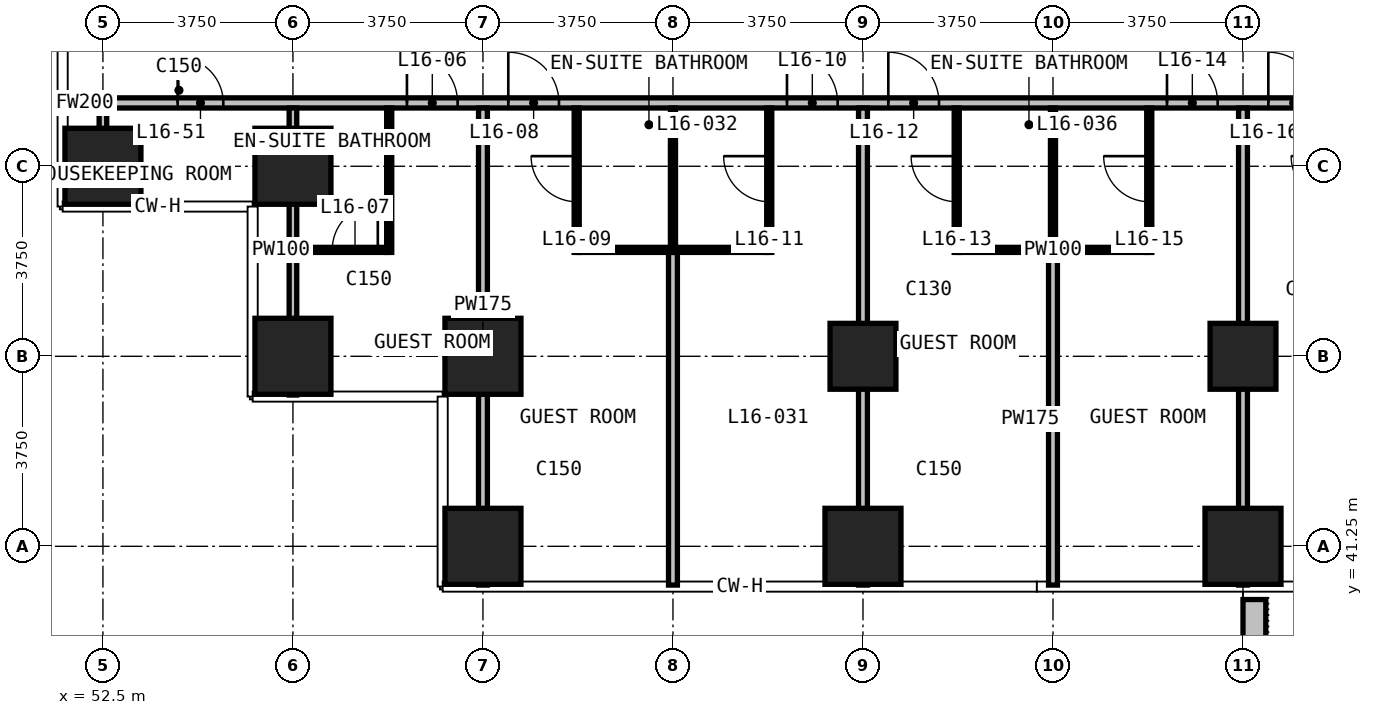
"""IFC4 building model, lengths in metres.
Left out: names, types, materials, properties, quantities, classifications, styles, units other than length and angle.
Written with IfcOpenShell. Run it as: python <this file> out.ifc"""

import sys

from ifc_helpers import new_model, si_unit, direction, frame, frame_2d, origin, origin_2d, place, context, subcontext, project, spatial, rectangle, extrude, element, fill, save


model = new_model("IFC4")
c1 = context("Model", 3, precision=1e-05, world=origin(), true_north=direction((0.0, 1.0)))
c2 = subcontext(c1, "Body", "Model", "MODEL_VIEW")
j1 = project(units=[si_unit("LENGTHUNIT", "METRE"), si_unit("PLANEANGLEUNIT", "RADIAN")], contexts=[c1])
p1 = place(None, origin())
s1 = spatial("IfcSite", under=j1, at=p1, CompositionType="ELEMENT")
p2 = place(p1, origin())
s2 = spatial("IfcBuilding", under=s1, at=p2, CompositionType="ELEMENT")
p3 = place(p2, frame((0.0, 0.0, 72.5)))
s3 = spatial("IfcBuildingStorey", under=s2, at=p3, CompositionType="ELEMENT", Elevation=72.5)
for number, where, z_axis, x_axis in (
    (1, (52.5, 48.75, 0.0), (0.0, 0.0, 1.0), (1.0, 0.0, 0.0)),
    (2, (56.25, 45.0, 0.0), (0.0, 0.0, 1.0), (1.0, 0.0, 0.0)),
    (3, (56.25, 48.75, 0.0), (0.0, 0.0, 1.0), (1.0, 0.0, 0.0)),
    (4, (60.0, 41.25, 0.0), (0.0, 0.0, 1.0), (1.0, 0.0, 0.0)),
    (5, (60.0, 45.0, 0.0), (0.0, 0.0, 1.0), (1.0, 0.0, 0.0)),
    (6, (67.5, 41.25, 0.0), (0.0, 0.0, 1.0), (1.0, 0.0, 0.0)),
):
    element("IfcColumn", number, at=place(p3, frame(where, z_axis=z_axis, x_axis=x_axis)), inside=s3, PredefinedType="COLUMN", context=c2, shape_type="SweptSolid", body=[
        extrude(rectangle(XDim=1.5, YDim=1.5, at=origin_2d()), origin(), (0.0, 0.0, 1.0), 3.3),
    ])
p4 = place(p3, frame((67.5, 45.0, 0.0), z_axis=(0.0, 0.0, 1.0), x_axis=(1.0, 0.0, 0.0)))
e7 = element("IfcColumn", 7, at=p4, inside=s3, PredefinedType="COLUMN", context=c2, shape_type="SweptSolid", body=[
    extrude(rectangle(XDim=1.3, YDim=1.3, at=origin_2d()), origin(), (0.0, 0.0, 1.0), 3.3),
])
p5 = place(p3, frame((75.0, 41.25, 0.0), z_axis=(0.0, 0.0, 1.0), x_axis=(1.0, 0.0, 0.0)))
e8 = element("IfcColumn", 8, at=p5, inside=s3, PredefinedType="COLUMN", context=c2, shape_type="SweptSolid", body=[
    extrude(rectangle(XDim=1.5, YDim=1.5, at=origin_2d()), origin(), (0.0, 0.0, 1.0), 3.3),
])
p6 = place(p3, frame((75.0, 45.0, 0.0), z_axis=(0.0, 0.0, 1.0), x_axis=(1.0, 0.0, 0.0)))
e9 = element("IfcColumn", 9, at=p6, inside=s3, PredefinedType="COLUMN", context=c2, shape_type="SweptSolid", body=[
    extrude(rectangle(XDim=1.3, YDim=1.3, at=origin_2d()), origin(), (0.0, 0.0, 1.0), 3.3),
])
p7 = place(p3, frame((75.225, 40.2, 0.0), z_axis=(0.0, 0.0, 1.0), x_axis=(0.0, -1.0, 0.0)))
e10 = element("IfcWall", 10, at=p7, inside=s3, PredefinedType="USERDEFINED", context=c2, shape_type="SweptSolid", body=[
    extrude(rectangle(XDim=2.35, YDim=0.45, at=frame_2d((1.175, 0.0))), origin(), (0.0, 0.0, 1.0), 1.1),
])
p8 = place(p3, frame((51.855, 50.0, 0.0), z_axis=(0.0, 0.0, 1.0), x_axis=(1.0, 0.0, 0.0)))
e11 = element("IfcWall", 11, at=p8, inside=s3, PredefinedType="PARTITIONING", context=c2, shape_type="SweptSolid", body=[
    extrude(rectangle(XDim=0.57, YDim=0.2, at=frame_2d((0.285, 0.0))), origin(), (0.0, 0.0, 1.0), 3.0),
])
p9 = place(p3, frame((52.575, 50.0, 0.0), z_axis=(0.0, 0.0, 1.0), x_axis=(1.0, 0.0, 0.0)))
e12 = element("IfcWall", 12, at=p9, inside=s3, PredefinedType="PARTITIONING", context=c2, shape_type="SweptSolid", body=[
    extrude(rectangle(XDim=44.85, YDim=0.2, at=frame_2d((22.425, 0.0))), origin(), (0.0, 0.0, 1.0), 3.0),
])
p10 = place(p9, frame((5.925, 0.0, 0.0)))
e13 = element("IfcOpeningElement", 13, at=p10, cuts=e12, PredefinedType="OPENING", context=c2, shape_type="SweptSolid", body=[
    extrude(rectangle(XDim=1.0, YDim=2.2, at=frame_2d((0.5, 1.1))), frame((0.0, 0.11, 0.0), z_axis=(0.0, -1.0, 0.0), x_axis=(1.0, 0.0, 0.0)), (0.0, 0.0, 1.0), 0.22),
])
p11 = place(p9, frame((7.925, 0.0, 0.0)))
e14 = element("IfcOpeningElement", 14, at=p11, cuts=e12, PredefinedType="OPENING", context=c2, shape_type="SweptSolid", body=[
    extrude(rectangle(XDim=1.0, YDim=2.2, at=frame_2d((0.5, 1.1))), frame((0.0, 0.11, 0.0), z_axis=(0.0, -1.0, 0.0), x_axis=(1.0, 0.0, 0.0)), (0.0, 0.0, 1.0), 0.22),
])
p12 = place(p9, frame((13.425, 0.0, 0.0)))
e15 = element("IfcOpeningElement", 15, at=p12, cuts=e12, PredefinedType="OPENING", context=c2, shape_type="SweptSolid", body=[
    extrude(rectangle(XDim=1.0, YDim=2.2, at=frame_2d((0.5, 1.1))), frame((0.0, 0.11, 0.0), z_axis=(0.0, -1.0, 0.0), x_axis=(1.0, 0.0, 0.0)), (0.0, 0.0, 1.0), 0.22),
])
p13 = place(p9, frame((15.425, 0.0, 0.0)))
e16 = element("IfcOpeningElement", 16, at=p13, cuts=e12, PredefinedType="OPENING", context=c2, shape_type="SweptSolid", body=[
    extrude(rectangle(XDim=1.0, YDim=2.2, at=frame_2d((0.5, 1.1))), frame((0.0, 0.11, 0.0), z_axis=(0.0, -1.0, 0.0), x_axis=(1.0, 0.0, 0.0)), (0.0, 0.0, 1.0), 0.22),
])
p14 = place(p9, frame((20.925, 0.0, 0.0)))
e17 = element("IfcOpeningElement", 17, at=p14, cuts=e12, PredefinedType="OPENING", context=c2, shape_type="SweptSolid", body=[
    extrude(rectangle(XDim=1.0, YDim=2.2, at=frame_2d((0.5, 1.1))), frame((0.0, 0.11, 0.0), z_axis=(0.0, -1.0, 0.0), x_axis=(1.0, 0.0, 0.0)), (0.0, 0.0, 1.0), 0.22),
])
p15 = place(p9, frame((22.925, 0.0, 0.0)))
e18 = element("IfcOpeningElement", 18, at=p15, cuts=e12, PredefinedType="OPENING", context=c2, shape_type="SweptSolid", body=[
    extrude(rectangle(XDim=1.0, YDim=2.2, at=frame_2d((0.5, 1.1))), frame((0.0, 0.11, 0.0), z_axis=(0.0, -1.0, 0.0), x_axis=(1.0, 0.0, 0.0)), (0.0, 0.0, 1.0), 0.22),
])
p16 = place(p9, frame((28.425, 0.0, 0.0)))
e19 = element("IfcOpeningElement", 19, at=p16, cuts=e12, PredefinedType="OPENING", context=c2, shape_type="SweptSolid", body=[
    extrude(rectangle(XDim=1.0, YDim=2.2, at=frame_2d((0.5, 1.1))), frame((0.0, 0.11, 0.0), z_axis=(0.0, -1.0, 0.0), x_axis=(1.0, 0.0, 0.0)), (0.0, 0.0, 1.0), 0.22),
])
p17 = place(p9, frame((30.425, 0.0, 0.0)))
e20 = element("IfcOpeningElement", 20, at=p17, cuts=e12, PredefinedType="OPENING", context=c2, shape_type="SweptSolid", body=[
    extrude(rectangle(XDim=1.0, YDim=2.2, at=frame_2d((0.5, 1.1))), frame((0.0, 0.11, 0.0), z_axis=(0.0, -1.0, 0.0), x_axis=(1.0, 0.0, 0.0)), (0.0, 0.0, 1.0), 0.22),
])
p18 = place(p9, frame((35.925, 0.0, 0.0)))
e21 = element("IfcOpeningElement", 21, at=p18, cuts=e12, PredefinedType="OPENING", context=c2, shape_type="SweptSolid", body=[
    extrude(rectangle(XDim=1.0, YDim=2.2, at=frame_2d((0.5, 1.1))), frame((0.0, 0.11, 0.0), z_axis=(0.0, -1.0, 0.0), x_axis=(1.0, 0.0, 0.0)), (0.0, 0.0, 1.0), 0.22),
])
p19 = place(p9, frame((37.925, 0.0, 0.0)))
e22 = element("IfcOpeningElement", 22, at=p19, cuts=e12, PredefinedType="OPENING", context=c2, shape_type="SweptSolid", body=[
    extrude(rectangle(XDim=1.0, YDim=2.2, at=frame_2d((0.5, 1.1))), frame((0.0, 0.11, 0.0), z_axis=(0.0, -1.0, 0.0), x_axis=(1.0, 0.0, 0.0)), (0.0, 0.0, 1.0), 0.22),
])
p20 = place(p9, frame((1.4, 0.0, 0.0)))
e23 = element("IfcOpeningElement", 23, at=p20, cuts=e12, PredefinedType="OPENING", context=c2, shape_type="SweptSolid", body=[
    extrude(rectangle(XDim=0.9, YDim=2.2, at=frame_2d((0.45, 1.1))), frame((0.0, 0.11, 0.0), z_axis=(0.0, -1.0, 0.0), x_axis=(1.0, 0.0, 0.0)), (0.0, 0.0, 1.0), 0.22),
])
p21 = place(p9, frame((42.575, 0.0, 0.0)))
e24 = element("IfcOpeningElement", 24, at=p21, cuts=e12, PredefinedType="OPENING", context=c2, shape_type="SweptSolid", body=[
    extrude(rectangle(XDim=0.9, YDim=2.2, at=frame_2d((0.45, 1.1))), frame((0.0, 0.11, 0.0), z_axis=(0.0, -1.0, 0.0), x_axis=(1.0, 0.0, 0.0)), (0.0, 0.0, 1.0), 0.22),
])
p22 = place(p3, frame((60.0, 40.485, 0.0), z_axis=(0.0, 0.0, 1.0), x_axis=(0.0, 1.0, 0.0)))
e25 = element("IfcWall", 25, at=p22, inside=s3, PredefinedType="PARTITIONING", context=c2, shape_type="SweptSolid", body=[
    extrude(rectangle(XDim=9.415, YDim=0.175, at=frame_2d((4.708, 0.0))), origin(), (0.0, 0.0, 1.0), 3.0),
])
p23 = place(p3, frame((63.75, 40.485, 0.0), z_axis=(0.0, 0.0, 1.0), x_axis=(0.0, 1.0, 0.0)))
e26 = element("IfcWall", 26, at=p23, inside=s3, PredefinedType="PARTITIONING", context=c2, shape_type="SweptSolid", body=[
    extrude(rectangle(XDim=6.565, YDim=0.175, at=frame_2d((3.282, 0.0))), origin(), (0.0, 0.0, 1.0), 3.0),
])
p24 = place(p3, frame((67.5, 40.485, 0.0), z_axis=(0.0, 0.0, 1.0), x_axis=(0.0, 1.0, 0.0)))
e27 = element("IfcWall", 27, at=p24, inside=s3, PredefinedType="PARTITIONING", context=c2, shape_type="SweptSolid", body=[
    extrude(rectangle(XDim=9.415, YDim=0.175, at=frame_2d((4.708, 0.0))), origin(), (0.0, 0.0, 1.0), 3.0),
])
p25 = place(p3, frame((71.25, 40.485, 0.0), z_axis=(0.0, 0.0, 1.0), x_axis=(0.0, 1.0, 0.0)))
e28 = element("IfcWall", 28, at=p25, inside=s3, PredefinedType="PARTITIONING", context=c2, shape_type="SweptSolid", body=[
    extrude(rectangle(XDim=6.565, YDim=0.175, at=frame_2d((3.282, 0.0))), origin(), (0.0, 0.0, 1.0), 3.0),
])
p26 = place(p3, frame((75.0, 40.485, 0.0), z_axis=(0.0, 0.0, 1.0), x_axis=(0.0, 1.0, 0.0)))
e29 = element("IfcWall", 29, at=p26, inside=s3, PredefinedType="PARTITIONING", context=c2, shape_type="SweptSolid", body=[
    extrude(rectangle(XDim=9.415, YDim=0.175, at=frame_2d((4.708, 0.0))), origin(), (0.0, 0.0, 1.0), 3.0),
])
p27 = place(p3, frame((52.5, 48.105, 0.0), z_axis=(0.0, 0.0, 1.0), x_axis=(0.0, 1.0, 0.0)))
e30 = element("IfcWall", 30, at=p27, inside=s3, PredefinedType="PARTITIONING", context=c2, shape_type="SweptSolid", body=[
    extrude(rectangle(XDim=1.995, YDim=0.15, at=frame_2d((0.998, 0.0))), origin(), (0.0, 0.0, 1.0), 3.0),
])
p28 = place(p3, frame((56.25, 44.235, 0.0), z_axis=(0.0, 0.0, 1.0), x_axis=(0.0, 1.0, 0.0)))
e31 = element("IfcWall", 31, at=p28, inside=s3, PredefinedType="PARTITIONING", context=c2, shape_type="SweptSolid", body=[
    extrude(rectangle(XDim=5.665, YDim=0.15, at=frame_2d((2.833, 0.0))), origin(), (0.0, 0.0, 1.0), 3.0),
])
p29 = place(p3, frame((56.325, 47.1, 0.0), z_axis=(0.0, 0.0, 1.0), x_axis=(1.0, 0.0, 0.0)))
e32 = element("IfcWall", 32, at=p29, inside=s3, PredefinedType="PARTITIONING", context=c2, shape_type="SweptSolid", body=[
    extrude(rectangle(XDim=1.775, YDim=0.1, at=frame_2d((0.888, 0.0))), origin(), (0.0, 0.0, 1.0), 3.0),
])
p30 = place(p29, frame((0.7, 0.0, 0.0)))
e33 = element("IfcOpeningElement", 33, at=p30, cuts=e32, PredefinedType="OPENING", context=c2, shape_type="SweptSolid", body=[
    extrude(rectangle(XDim=0.9, YDim=2.2, at=frame_2d((0.45, 1.1))), frame((0.0, 0.06, 0.0), z_axis=(0.0, -1.0, 0.0), x_axis=(1.0, 0.0, 0.0)), (0.0, 0.0, 1.0), 0.12),
])
for number, where, z_axis, x_axis in (
    (34, (61.9, 47.1, 0.0), (0.0, 0.0, 1.0), (1.0, 0.0, 0.0)),
    (35, (69.4, 47.1, 0.0), (0.0, 0.0, 1.0), (1.0, 0.0, 0.0)),
):
    element("IfcWall", number, at=place(p3, frame(where, z_axis=z_axis, x_axis=x_axis)), inside=s3, PredefinedType="PARTITIONING", context=c2, shape_type="SweptSolid", body=[
        extrude(rectangle(XDim=3.7, YDim=0.1, at=frame_2d((1.85, 0.0))), origin(), (0.0, 0.0, 1.0), 3.0),
    ])
p31 = place(p3, frame((58.15, 47.05, 0.0), z_axis=(0.0, 0.0, 1.0), x_axis=(0.0, 1.0, 0.0)))
e36 = element("IfcWall", 36, at=p31, inside=s3, PredefinedType="PARTITIONING", context=c2, shape_type="SweptSolid", body=[
    extrude(rectangle(XDim=2.85, YDim=0.1, at=frame_2d((1.425, 0.0))), origin(), (0.0, 0.0, 1.0), 3.0),
])
p32 = place(p3, frame((61.85, 47.05, 0.0), z_axis=(0.0, 0.0, 1.0), x_axis=(0.0, 1.0, 0.0)))
e37 = element("IfcWall", 37, at=p32, inside=s3, PredefinedType="PARTITIONING", context=c2, shape_type="SweptSolid", body=[
    extrude(rectangle(XDim=2.85, YDim=0.1, at=frame_2d((1.425, 0.0))), origin(), (0.0, 0.0, 1.0), 3.0),
])
p33 = place(p32, frame((1.0, 0.0, 0.0)))
e38 = element("IfcOpeningElement", 38, at=p33, cuts=e37, PredefinedType="OPENING", context=c2, shape_type="SweptSolid", body=[
    extrude(rectangle(XDim=0.9, YDim=2.2, at=frame_2d((0.45, 1.1))), frame((0.0, 0.06, 0.0), z_axis=(0.0, -1.0, 0.0), x_axis=(1.0, 0.0, 0.0)), (0.0, 0.0, 1.0), 0.12),
])
p34 = place(p3, frame((63.75, 47.15, 0.0), z_axis=(0.0, 0.0, 1.0), x_axis=(0.0, 1.0, 0.0)))
e39 = element("IfcWall", 39, at=p34, inside=s3, PredefinedType="PARTITIONING", context=c2, shape_type="SweptSolid", body=[
    extrude(rectangle(XDim=2.75, YDim=0.1, at=frame_2d((1.375, 0.0))), origin(), (0.0, 0.0, 1.0), 3.0),
])
p35 = place(p3, frame((65.65, 47.05, 0.0), z_axis=(0.0, 0.0, 1.0), x_axis=(0.0, 1.0, 0.0)))
e40 = element("IfcWall", 40, at=p35, inside=s3, PredefinedType="PARTITIONING", context=c2, shape_type="SweptSolid", body=[
    extrude(rectangle(XDim=2.85, YDim=0.1, at=frame_2d((1.425, 0.0))), origin(), (0.0, 0.0, 1.0), 3.0),
])
p36 = place(p35, frame((1.0, 0.0, 0.0)))
e41 = element("IfcOpeningElement", 41, at=p36, cuts=e40, PredefinedType="OPENING", context=c2, shape_type="SweptSolid", body=[
    extrude(rectangle(XDim=0.9, YDim=2.2, at=frame_2d((0.45, 1.1))), frame((0.0, 0.06, 0.0), z_axis=(0.0, -1.0, 0.0), x_axis=(1.0, 0.0, 0.0)), (0.0, 0.0, 1.0), 0.12),
])
p37 = place(p3, frame((69.35, 47.05, 0.0), z_axis=(0.0, 0.0, 1.0), x_axis=(0.0, 1.0, 0.0)))
e42 = element("IfcWall", 42, at=p37, inside=s3, PredefinedType="PARTITIONING", context=c2, shape_type="SweptSolid", body=[
    extrude(rectangle(XDim=2.85, YDim=0.1, at=frame_2d((1.425, 0.0))), origin(), (0.0, 0.0, 1.0), 3.0),
])
p38 = place(p37, frame((1.0, 0.0, 0.0)))
e43 = element("IfcOpeningElement", 43, at=p38, cuts=e42, PredefinedType="OPENING", context=c2, shape_type="SweptSolid", body=[
    extrude(rectangle(XDim=0.9, YDim=2.2, at=frame_2d((0.45, 1.1))), frame((0.0, 0.06, 0.0), z_axis=(0.0, -1.0, 0.0), x_axis=(1.0, 0.0, 0.0)), (0.0, 0.0, 1.0), 0.12),
])
p39 = place(p3, frame((71.25, 47.15, 0.0), z_axis=(0.0, 0.0, 1.0), x_axis=(0.0, 1.0, 0.0)))
e44 = element("IfcWall", 44, at=p39, inside=s3, PredefinedType="PARTITIONING", context=c2, shape_type="SweptSolid", body=[
    extrude(rectangle(XDim=2.75, YDim=0.1, at=frame_2d((1.375, 0.0))), origin(), (0.0, 0.0, 1.0), 3.0),
])
p40 = place(p3, frame((73.15, 47.05, 0.0), z_axis=(0.0, 0.0, 1.0), x_axis=(0.0, 1.0, 0.0)))
e45 = element("IfcWall", 45, at=p40, inside=s3, PredefinedType="PARTITIONING", context=c2, shape_type="SweptSolid", body=[
    extrude(rectangle(XDim=2.85, YDim=0.1, at=frame_2d((1.425, 0.0))), origin(), (0.0, 0.0, 1.0), 3.0),
])
p41 = place(p40, frame((1.0, 0.0, 0.0)))
e46 = element("IfcOpeningElement", 46, at=p41, cuts=e45, PredefinedType="OPENING", context=c2, shape_type="SweptSolid", body=[
    extrude(rectangle(XDim=0.9, YDim=2.2, at=frame_2d((0.45, 1.1))), frame((0.0, 0.06, 0.0), z_axis=(0.0, -1.0, 0.0), x_axis=(1.0, 0.0, 0.0)), (0.0, 0.0, 1.0), 0.12),
])
p42 = place(p10, origin())
e47 = element("IfcDoor", 47, at=p42, inside=s3, OperationType="SINGLE_SWING_LEFT", PredefinedType="DOOR", context=c2, shape_type="SweptSolid", body=[
    extrude(rectangle(XDim=1.0, YDim=2.2, at=frame_2d((0.5, 1.1))), frame((0.0, 0.025, 0.0), z_axis=(0.0, -1.0, 0.0), x_axis=(1.0, 0.0, 0.0)), (0.0, 0.0, 1.0), 0.05),
])
fill(e13, e47)
p43 = place(p30, origin())
e48 = element("IfcDoor", 48, at=p43, inside=s3, OperationType="SINGLE_SWING_RIGHT", PredefinedType="DOOR", context=c2, shape_type="SweptSolid", body=[
    extrude(rectangle(XDim=0.9, YDim=2.2, at=frame_2d((0.45, 1.1))), frame((0.0, 0.025, 0.0), z_axis=(0.0, -1.0, 0.0), x_axis=(1.0, 0.0, 0.0)), (0.0, 0.0, 1.0), 0.05),
])
fill(e33, e48)
p44 = place(p11, origin())
e49 = element("IfcDoor", 49, at=p44, inside=s3, OperationType="SINGLE_SWING_LEFT", PredefinedType="DOOR", context=c2, shape_type="SweptSolid", body=[
    extrude(rectangle(XDim=1.0, YDim=2.2, at=frame_2d((0.5, 1.1))), frame((0.0, 0.025, 0.0), z_axis=(0.0, -1.0, 0.0), x_axis=(1.0, 0.0, 0.0)), (0.0, 0.0, 1.0), 0.05),
])
fill(e14, e49)
p45 = place(p33, origin())
e50 = element("IfcDoor", 50, at=p45, inside=s3, OperationType="SINGLE_SWING_RIGHT", PredefinedType="DOOR", context=c2, shape_type="SweptSolid", body=[
    extrude(rectangle(XDim=0.9, YDim=2.2, at=frame_2d((0.45, 1.1))), frame((0.0, 0.025, 0.0), z_axis=(0.0, -1.0, 0.0), x_axis=(1.0, 0.0, 0.0)), (0.0, 0.0, 1.0), 0.05),
])
fill(e38, e50)
p46 = place(p12, origin())
e51 = element("IfcDoor", 51, at=p46, inside=s3, OperationType="SINGLE_SWING_LEFT", PredefinedType="DOOR", context=c2, shape_type="SweptSolid", body=[
    extrude(rectangle(XDim=1.0, YDim=2.2, at=frame_2d((0.5, 1.1))), frame((0.0, 0.025, 0.0), z_axis=(0.0, -1.0, 0.0), x_axis=(1.0, 0.0, 0.0)), (0.0, 0.0, 1.0), 0.05),
])
fill(e15, e51)
p47 = place(p36, origin())
e52 = element("IfcDoor", 52, at=p47, inside=s3, OperationType="SINGLE_SWING_RIGHT", PredefinedType="DOOR", context=c2, shape_type="SweptSolid", body=[
    extrude(rectangle(XDim=0.9, YDim=2.2, at=frame_2d((0.45, 1.1))), frame((0.0, 0.025, 0.0), z_axis=(0.0, -1.0, 0.0), x_axis=(1.0, 0.0, 0.0)), (0.0, 0.0, 1.0), 0.05),
])
fill(e41, e52)
p48 = place(p13, origin())
e53 = element("IfcDoor", 53, at=p48, inside=s3, OperationType="SINGLE_SWING_RIGHT", PredefinedType="DOOR", context=c2, shape_type="SweptSolid", body=[
    extrude(rectangle(XDim=1.0, YDim=2.2, at=frame_2d((0.5, 1.1))), frame((0.0, 0.025, 0.0), z_axis=(0.0, -1.0, 0.0), x_axis=(1.0, 0.0, 0.0)), (0.0, 0.0, 1.0), 0.05),
])
fill(e16, e53)
p49 = place(p38, origin())
e54 = element("IfcDoor", 54, at=p49, inside=s3, OperationType="SINGLE_SWING_RIGHT", PredefinedType="DOOR", context=c2, shape_type="SweptSolid", body=[
    extrude(rectangle(XDim=0.9, YDim=2.2, at=frame_2d((0.45, 1.1))), frame((0.0, 0.025, 0.0), z_axis=(0.0, -1.0, 0.0), x_axis=(1.0, 0.0, 0.0)), (0.0, 0.0, 1.0), 0.05),
])
fill(e43, e54)
p50 = place(p14, origin())
e55 = element("IfcDoor", 55, at=p50, inside=s3, OperationType="SINGLE_SWING_LEFT", PredefinedType="DOOR", context=c2, shape_type="SweptSolid", body=[
    extrude(rectangle(XDim=1.0, YDim=2.2, at=frame_2d((0.5, 1.1))), frame((0.0, 0.025, 0.0), z_axis=(0.0, -1.0, 0.0), x_axis=(1.0, 0.0, 0.0)), (0.0, 0.0, 1.0), 0.05),
])
fill(e17, e55)
p51 = place(p41, origin())
e56 = element("IfcDoor", 56, at=p51, inside=s3, OperationType="SINGLE_SWING_RIGHT", PredefinedType="DOOR", context=c2, shape_type="SweptSolid", body=[
    extrude(rectangle(XDim=0.9, YDim=2.2, at=frame_2d((0.45, 1.1))), frame((0.0, 0.025, 0.0), z_axis=(0.0, -1.0, 0.0), x_axis=(1.0, 0.0, 0.0)), (0.0, 0.0, 1.0), 0.05),
])
fill(e46, e56)
p52 = place(p15, origin())
e57 = element("IfcDoor", 57, at=p52, inside=s3, OperationType="SINGLE_SWING_LEFT", PredefinedType="DOOR", context=c2, shape_type="SweptSolid", body=[
    extrude(rectangle(XDim=1.0, YDim=2.2, at=frame_2d((0.5, 1.1))), frame((0.0, 0.025, 0.0), z_axis=(0.0, -1.0, 0.0), x_axis=(1.0, 0.0, 0.0)), (0.0, 0.0, 1.0), 0.05),
])
fill(e18, e57)
p53 = place(p20, origin())
e58 = element("IfcDoor", 58, at=p53, inside=s3, OperationType="SINGLE_SWING_LEFT", PredefinedType="DOOR", context=c2, shape_type="SweptSolid", body=[
    extrude(rectangle(XDim=0.9, YDim=2.2, at=frame_2d((0.45, 1.1))), frame((0.0, 0.025, 0.0), z_axis=(0.0, -1.0, 0.0), x_axis=(1.0, 0.0, 0.0)), (0.0, 0.0, 1.0), 0.05),
])
fill(e23, e58)
save(model, sys.argv[1])
